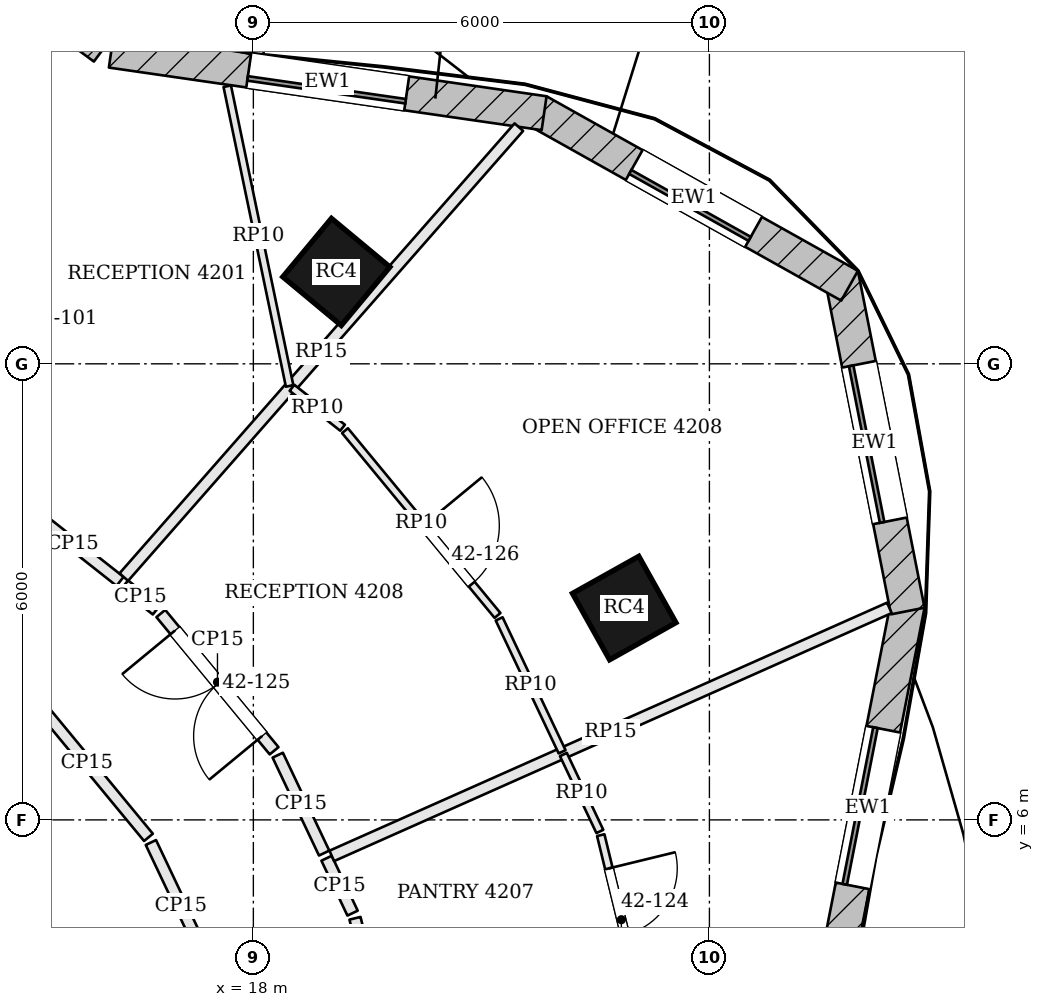
"""IFC4 building model, lengths in metres.
Left out: names, types, materials, properties, quantities, classifications, styles, units other than length and angle.
Written with IfcOpenShell. Run it as: python <this file> out.ifc"""

import sys

from ifc_helpers import new_model, si_unit, direction, frame, frame_2d, origin, origin_2d, place, context, subcontext, project, spatial, rectangle, extrude, element, fill, save


model = new_model("IFC4")
c1 = context("Model", 3, precision=1e-05, world=origin(), true_north=direction((0.0, 1.0)))
c2 = subcontext(c1, "Body", "Model", "MODEL_VIEW")
j1 = project(units=[si_unit("LENGTHUNIT", "METRE"), si_unit("PLANEANGLEUNIT", "RADIAN")], contexts=[c1])
p1 = place(None, origin())
s1 = spatial("IfcSite", under=j1, at=p1, CompositionType="ELEMENT")
p2 = place(p1, origin())
s2 = spatial("IfcBuilding", under=s1, at=p2, CompositionType="ELEMENT")
p3 = place(p2, frame((0.0, 0.0, 174.0)))
s3 = spatial("IfcBuildingStorey", under=s2, at=p3, CompositionType="ELEMENT", Elevation=174.0)
for number, where, z_axis, x_axis in (
    (1, (22.879, 8.787, -0.7), (0.0, 0.0, 1.0), (-0.489, 0.873, 0.0)),
    (2, (19.092, 13.209, -0.7), (0.0, 0.0, 1.0), (-0.769, 0.639, 0.0)),
):
    element("IfcColumn", number, at=place(p3, frame(where, z_axis=z_axis, x_axis=x_axis)), inside=s3, PredefinedType="COLUMN", context=c2, shape_type="SweptSolid", body=[
        extrude(rectangle(XDim=1.0, YDim=1.0, at=origin_2d()), origin(), (0.0, 0.0, 1.0), 4.6),
    ])
p4 = place(p3, frame((25.561, 3.49, 0.0), z_axis=(0.0, 0.0, 1.0), x_axis=(0.192494026297, 0.981298145234, 0.0)))
e3 = element("IfcWall", 3, at=p4, inside=s3, PredefinedType="SOLIDWALL", context=c2, shape_type="SweptSolid", body=[
    extrude(rectangle(XDim=5.446, YDim=0.45, at=frame_2d((2.723, 0.0))), origin(), (0.0, 0.0, 1.0), 3.7),
])
p5 = place(p4, frame((1.673, 0.0, 0.9)))
e4 = element("IfcOpeningElement", 4, at=p5, cuts=e3, PredefinedType="OPENING", context=c2, shape_type="SweptSolid", body=[
    extrude(rectangle(XDim=2.1, YDim=2.3, at=frame_2d((1.05, 1.15))), frame((0.0, 0.235, 0.0), z_axis=(0.0, -1.0, 0.0), x_axis=(1.0, 0.0, 0.0)), (0.0, 0.0, 1.0), 0.47),
])
p6 = place(p3, frame((26.61, 8.748, 0.0), z_axis=(0.0, 0.0, 1.0), x_axis=(-0.193923166402, 0.981016720312, 0.0)))
e5 = element("IfcWall", 5, at=p6, inside=s3, PredefinedType="SOLIDWALL", context=c2, shape_type="SweptSolid", body=[
    extrude(rectangle(XDim=4.518, YDim=0.45, at=frame_2d((2.259, 0.0))), origin(), (0.0, 0.0, 1.0), 3.7),
])
p7 = place(p6, frame((1.209, 0.0, 0.9)))
e6 = element("IfcOpeningElement", 6, at=p7, cuts=e5, PredefinedType="OPENING", context=c2, shape_type="SweptSolid", body=[
    extrude(rectangle(XDim=2.1, YDim=2.3, at=frame_2d((1.05, 1.15))), frame((0.0, 0.235, 0.0), z_axis=(0.0, -1.0, 0.0), x_axis=(1.0, 0.0, 0.0)), (0.0, 0.0, 1.0), 0.47),
])
p8 = place(p3, frame((25.844, 13.028, 0.0), z_axis=(0.0, 0.0, 1.0), x_axis=(-0.872346398261, 0.488888291373, 0.0)))
e7 = element("IfcWall", 7, at=p8, inside=s3, PredefinedType="SOLIDWALL", context=c2, shape_type="SweptSolid", body=[
    extrude(rectangle(XDim=4.696, YDim=0.45, at=frame_2d((2.348, 0.0))), origin(), (0.0, 0.0, 1.0), 3.7),
])
p9 = place(p8, frame((1.448, 0.0, 0.9)))
e8 = element("IfcOpeningElement", 8, at=p9, cuts=e7, PredefinedType="OPENING", context=c2, shape_type="SweptSolid", body=[
    extrude(rectangle(XDim=1.8, YDim=2.3, at=frame_2d((0.9, 1.15))), frame((0.0, 0.235, 0.0), z_axis=(0.0, -1.0, 0.0), x_axis=(1.0, 0.0, 0.0)), (0.0, 0.0, 1.0), 0.47),
])
p10 = place(p3, frame((21.825, 15.297, 0.0), z_axis=(0.0, 0.0, 1.0), x_axis=(-0.98971474215, 0.143054986527, 0.0)))
e9 = element("IfcWall", 9, at=p10, inside=s3, PredefinedType="SOLIDWALL", context=c2, shape_type="SweptSolid", body=[
    extrude(rectangle(XDim=5.753, YDim=0.45, at=frame_2d((2.876, 0.0))), origin(), (0.0, 0.0, 1.0), 3.7),
])
p11 = place(p10, frame((1.826, 0.0, 0.9)))
e10 = element("IfcOpeningElement", 10, at=p11, cuts=e9, PredefinedType="OPENING", context=c2, shape_type="SweptSolid", body=[
    extrude(rectangle(XDim=2.1, YDim=2.3, at=frame_2d((1.05, 1.15))), frame((0.0, 0.235, 0.0), z_axis=(0.0, -1.0, 0.0), x_axis=(1.0, 0.0, 0.0)), (0.0, 0.0, 1.0), 0.47),
])
p12 = place(p3, frame((16.036, 16.158, 0.0), z_axis=(0.0, 0.0, 1.0), x_axis=(-0.805181432967, 0.593028549064, 0.0)))
e11 = element("IfcWall", 11, at=p12, inside=s3, PredefinedType="SOLIDWALL", context=c2, shape_type="SweptSolid", body=[
    extrude(rectangle(XDim=3.469, YDim=0.45, at=frame_2d((1.734, 0.0))), origin(), (0.0, 0.0, 1.0), 3.7),
])
p13 = place(p12, frame((0.684, 0.0, 0.9)))
e12 = element("IfcOpeningElement", 12, at=p13, cuts=e11, PredefinedType="OPENING", context=c2, shape_type="SweptSolid", body=[
    extrude(rectangle(XDim=2.1, YDim=2.3, at=frame_2d((1.05, 1.15))), frame((0.0, 0.235, 0.0), z_axis=(0.0, -1.0, 0.0), x_axis=(1.0, 0.0, 0.0)), (0.0, 0.0, 1.0), 0.47),
])
p14 = place(p3, frame((16.246, 9.138, 0.0), z_axis=(0.0, 0.0, 1.0), x_axis=(-0.785126783061, 0.619335074512, 0.0)))
e13 = element("IfcWall", 13, at=p14, inside=s3, PredefinedType="PARTITIONING", context=c2, shape_type="SweptSolid", body=[
    extrude(rectangle(XDim=1.587, YDim=0.15, at=frame_2d((0.794, 0.0))), origin(), (0.0, 0.0, 1.0), 3.084),
])
p15 = place(p3, frame((21.493, 15.114, 0.0), z_axis=(0.0, 0.0, 1.0), x_axis=(-0.659778549164, -0.751460089467, 0.0)))
e14 = element("IfcWall", 14, at=p15, inside=s3, PredefinedType="PARTITIONING", context=c2, shape_type="SweptSolid", body=[
    extrude(rectangle(XDim=7.877, YDim=0.15, at=frame_2d((3.938, 0.0))), origin(), (0.0, 0.0, 1.0), 3.234),
])
p16 = place(p3, frame((19.722, 3.125, 0.0), z_axis=(0.0, 0.0, 1.0), x_axis=(-0.236703930685, 0.971581828359, 0.0)))
e15 = element("IfcWall", 15, at=p16, inside=s3, PredefinedType="PARTITIONING", context=c2, shape_type="SweptSolid", body=[
    extrude(rectangle(XDim=1.626, YDim=0.15, at=frame_2d((0.813, 0.0))), origin(), (0.0, 0.0, 1.0), 3.084),
])
p17 = place(p16, frame((0.35, 0.0, 0.0)))
e16 = element("IfcOpeningElement", 16, at=p17, cuts=e15, PredefinedType="OPENING", context=c2, shape_type="SweptSolid", body=[
    extrude(rectangle(XDim=0.9, YDim=2.1, at=frame_2d((0.45, 1.05))), frame((0.0, 0.085, 0.0), z_axis=(0.0, -1.0, 0.0), x_axis=(1.0, 0.0, 0.0)), (0.0, 0.0, 1.0), 0.17),
])
p18 = place(p3, frame((19.305, 4.773, 0.0), z_axis=(0.0, 0.0, 1.0), x_axis=(-0.428296443676, 0.90363828844, 0.0)))
e17 = element("IfcWall", 17, at=p18, inside=s3, PredefinedType="PARTITIONING", context=c2, shape_type="SweptSolid", body=[
    extrude(rectangle(XDim=0.799, YDim=0.15, at=frame_2d((0.399, 0.0))), origin(), (0.0, 0.0, 1.0), 3.084),
])
p19 = place(p3, frame((26.367, 8.789, 0.0), z_axis=(0.0, 0.0, 1.0), x_axis=(-0.913673557468, -0.406448804137, 0.0)))
e18 = element("IfcWall", 18, at=p19, inside=s3, PredefinedType="PARTITIONING", context=c2, shape_type="SweptSolid", body=[
    extrude(rectangle(XDim=8.029, YDim=0.15, at=frame_2d((4.014, 0.0))), origin(), (0.0, 0.0, 1.0), 3.234),
])
p20 = place(p3, frame((18.931, 5.563, 0.0), z_axis=(0.0, 0.0, 1.0), x_axis=(-0.428204145682, 0.903682029046, 0.0)))
e19 = element("IfcWall", 19, at=p20, inside=s3, PredefinedType="PARTITIONING", context=c2, shape_type="SweptSolid", body=[
    extrude(rectangle(XDim=1.425, YDim=0.15, at=frame_2d((0.713, 0.0))), origin(), (0.0, 0.0, 1.0), 3.084),
])
p21 = place(p3, frame((18.273, 6.909, 0.0), z_axis=(0.0, 0.0, 1.0), x_axis=(-0.63653648943, 0.771246586783, 0.0)))
e20 = element("IfcWall", 20, at=p21, inside=s3, PredefinedType="PARTITIONING", context=c2, shape_type="SweptSolid", body=[
    extrude(rectangle(XDim=2.342, YDim=0.15, at=frame_2d((1.171, 0.0))), origin(), (0.0, 0.0, 1.0), 3.084),
])
p22 = place(p21, frame((0.25, 0.0, 0.0)))
e21 = element("IfcOpeningElement", 21, at=p22, cuts=e20, PredefinedType="OPENING", context=c2, shape_type="SweptSolid", body=[
    extrude(rectangle(XDim=1.8, YDim=2.1, at=frame_2d((0.9, 1.05))), frame((0.0, 0.085, 0.0), z_axis=(0.0, -1.0, 0.0), x_axis=(1.0, 0.0, 0.0)), (0.0, 0.0, 1.0), 0.17),
])
p23 = place(p3, frame((16.724, 8.761, 0.0), z_axis=(0.0, 0.0, 1.0), x_axis=(-0.785093642841, 0.619377083827, 0.0)))
e22 = element("IfcWall", 22, at=p23, inside=s3, PredefinedType="PARTITIONING", context=c2, shape_type="SweptSolid", body=[
    extrude(rectangle(XDim=0.533, YDim=0.15, at=frame_2d((0.267, 0.0))), origin(), (0.0, 0.0, 1.0), 3.084),
])
p24 = place(p3, frame((15.0, 7.733, 0.0), z_axis=(0.0, 0.0, 1.0), x_axis=(0.636601263488, -0.771193121938, 0.0)))
e23 = element("IfcWall", 23, at=p24, inside=s3, PredefinedType="PARTITIONING", context=c2, shape_type="SweptSolid", body=[
    extrude(rectangle(XDim=2.545, YDim=0.15, at=frame_2d((1.272, 0.0))), origin(), (0.0, 0.0, 1.0), 3.084),
])
p25 = place(p3, frame((16.652, 5.702, 0.0), z_axis=(0.0, 0.0, 1.0), x_axis=(0.428126129773, -0.903718992279, 0.0)))
e24 = element("IfcWall", 24, at=p25, inside=s3, PredefinedType="PARTITIONING", context=c2, shape_type="SweptSolid", body=[
    extrude(rectangle(XDim=1.846, YDim=0.15, at=frame_2d((0.923, 0.0))), origin(), (0.0, 0.0, 1.0), 3.084),
])
p26 = place(p3, frame((17.656, 15.652, 0.0), z_axis=(0.0, 0.0, 1.0), x_axis=(0.203733969948, -0.979026286414, 0.0)))
e25 = element("IfcWall", 25, at=p26, inside=s3, PredefinedType="PARTITIONING", context=c2, shape_type="SweptSolid", body=[
    extrude(rectangle(XDim=4.028, YDim=0.1, at=frame_2d((2.014, 0.0))), origin(), (0.0, 0.0, 1.0), 3.084),
])
p27 = place(p3, frame((22.079, 6.86, 0.0), z_axis=(0.0, 0.0, 1.0), x_axis=(0.428105084675, -0.903728961844, 0.0)))
e26 = element("IfcWall", 26, at=p27, inside=s3, PredefinedType="PARTITIONING", context=c2, shape_type="SweptSolid", body=[
    extrude(rectangle(XDim=1.12, YDim=0.1, at=frame_2d((0.56, 0.0))), origin(), (0.0, 0.0, 1.0), 3.084),
])
p28 = place(p3, frame((22.57, 5.799, 0.0), z_axis=(0.0, 0.0, 1.0), x_axis=(0.236811358433, -0.971555649727, 0.0)))
e27 = element("IfcWall", 27, at=p28, inside=s3, PredefinedType="PARTITIONING", context=c2, shape_type="SweptSolid", body=[
    extrude(rectangle(XDim=2.29, YDim=0.1, at=frame_2d((1.145, 0.0))), origin(), (0.0, 0.0, 1.0), 3.084),
])
p29 = place(p28, frame((0.45, 0.0, 0.0)))
e28 = element("IfcOpeningElement", 28, at=p29, cuts=e27, PredefinedType="OPENING", context=c2, shape_type="SweptSolid", body=[
    extrude(rectangle(XDim=0.9, YDim=2.1, at=frame_2d((0.45, 1.05))), frame((0.0, 0.06, 0.0), z_axis=(0.0, -1.0, 0.0), x_axis=(1.0, 0.0, 0.0)), (0.0, 0.0, 1.0), 0.12),
])
p30 = place(p3, frame((18.508, 11.684, 0.0), z_axis=(0.0, 0.0, 1.0), x_axis=(0.785067093858, -0.619410734603, 0.0)))
e29 = element("IfcWall", 29, at=p30, inside=s3, PredefinedType="PARTITIONING", context=c2, shape_type="SweptSolid", body=[
    extrude(rectangle(XDim=0.847, YDim=0.1, at=frame_2d((0.424, 0.0))), origin(), (0.0, 0.0, 1.0), 3.084),
])
p31 = place(p3, frame((19.206, 11.121, 0.0), z_axis=(0.0, 0.0, 1.0), x_axis=(0.636597206989, -0.771196470462, 0.0)))
e30 = element("IfcWall", 30, at=p31, inside=s3, PredefinedType="PARTITIONING", context=c2, shape_type="SweptSolid", body=[
    extrude(rectangle(XDim=3.152, YDim=0.1, at=frame_2d((1.576, 0.0))), origin(), (0.0, 0.0, 1.0), 3.084),
])
p32 = place(p31, frame((1.619, 0.0, 0.0)))
e31 = element("IfcOpeningElement", 31, at=p32, cuts=e30, PredefinedType="OPENING", context=c2, shape_type="SweptSolid", body=[
    extrude(rectangle(XDim=1.0, YDim=2.1, at=frame_2d((0.5, 1.05))), frame((0.0, 0.06, 0.0), z_axis=(0.0, -1.0, 0.0), x_axis=(1.0, 0.0, 0.0)), (0.0, 0.0, 1.0), 0.12),
])
p33 = place(p3, frame((21.234, 8.644, 0.0), z_axis=(0.0, 0.0, 1.0), x_axis=(0.428183987328, -0.903691580682, 0.0)))
e32 = element("IfcWall", 32, at=p33, inside=s3, PredefinedType="PARTITIONING", context=c2, shape_type="SweptSolid", body=[
    extrude(rectangle(XDim=1.935, YDim=0.1, at=frame_2d((0.967, 0.0))), origin(), (0.0, 0.0, 1.0), 3.084),
])
p34 = place(p5, origin())
e33 = element("IfcWindow", 33, at=p34, inside=s3, PartitioningType="SINGLE_PANEL", PredefinedType="WINDOW", context=c2, shape_type="SweptSolid", body=[
    extrude(rectangle(XDim=2.1, YDim=2.3, at=frame_2d((1.05, 1.15))), frame((0.0, 0.135, 0.0), z_axis=(0.0, -1.0, 0.0), x_axis=(1.0, 0.0, 0.0)), (0.0, 0.0, 1.0), 0.06),
])
fill(e4, e33)
p35 = place(p7, origin())
e34 = element("IfcWindow", 34, at=p35, inside=s3, PartitioningType="SINGLE_PANEL", PredefinedType="WINDOW", context=c2, shape_type="SweptSolid", body=[
    extrude(rectangle(XDim=2.1, YDim=2.3, at=frame_2d((1.05, 1.15))), frame((0.0, 0.135, 0.0), z_axis=(0.0, -1.0, 0.0), x_axis=(1.0, 0.0, 0.0)), (0.0, 0.0, 1.0), 0.06),
])
fill(e6, e34)
p36 = place(p9, origin())
e35 = element("IfcWindow", 35, at=p36, inside=s3, PartitioningType="SINGLE_PANEL", PredefinedType="WINDOW", context=c2, shape_type="SweptSolid", body=[
    extrude(rectangle(XDim=1.8, YDim=2.3, at=frame_2d((0.9, 1.15))), frame((0.0, 0.135, 0.0), z_axis=(0.0, -1.0, 0.0), x_axis=(1.0, 0.0, 0.0)), (0.0, 0.0, 1.0), 0.06),
])
fill(e8, e35)
p37 = place(p11, origin())
e36 = element("IfcWindow", 36, at=p37, inside=s3, PartitioningType="SINGLE_PANEL", PredefinedType="WINDOW", context=c2, shape_type="SweptSolid", body=[
    extrude(rectangle(XDim=2.1, YDim=2.3, at=frame_2d((1.05, 1.15))), frame((0.0, 0.135, 0.0), z_axis=(0.0, -1.0, 0.0), x_axis=(1.0, 0.0, 0.0)), (0.0, 0.0, 1.0), 0.06),
])
fill(e10, e36)
p38 = place(p29, origin())
e37 = element("IfcDoor", 37, at=p38, inside=s3, OperationType="SINGLE_SWING_LEFT", PredefinedType="DOOR", context=c2, shape_type="SweptSolid", body=[
    extrude(rectangle(XDim=0.9, YDim=2.1, at=frame_2d((0.45, 1.05))), frame((0.0, 0.025, 0.0), z_axis=(0.0, -1.0, 0.0), x_axis=(1.0, 0.0, 0.0)), (0.0, 0.0, 1.0), 0.05),
])
fill(e28, e37)
p39 = place(p22, origin())
e38 = element("IfcDoor", 38, at=p39, inside=s3, OperationType="DOUBLE_DOOR_SINGLE_SWING", PredefinedType="DOOR", context=c2, shape_type="SweptSolid", body=[
    extrude(rectangle(XDim=1.8, YDim=2.1, at=frame_2d((0.9, 1.05))), frame((0.0, 0.025, 0.0), z_axis=(0.0, -1.0, 0.0), x_axis=(1.0, 0.0, 0.0)), (0.0, 0.0, 1.0), 0.05),
])
fill(e21, e38)
p40 = place(p32, origin())
e39 = element("IfcDoor", 39, at=p40, inside=s3, OperationType="SINGLE_SWING_LEFT", PredefinedType="DOOR", context=c2, shape_type="SweptSolid", body=[
    extrude(rectangle(XDim=1.0, YDim=2.1, at=frame_2d((0.5, 1.05))), frame((0.0, 0.025, 0.0), z_axis=(0.0, -1.0, 0.0), x_axis=(1.0, 0.0, 0.0)), (0.0, 0.0, 1.0), 0.05),
])
fill(e31, e39)
save(model, sys.argv[1])
